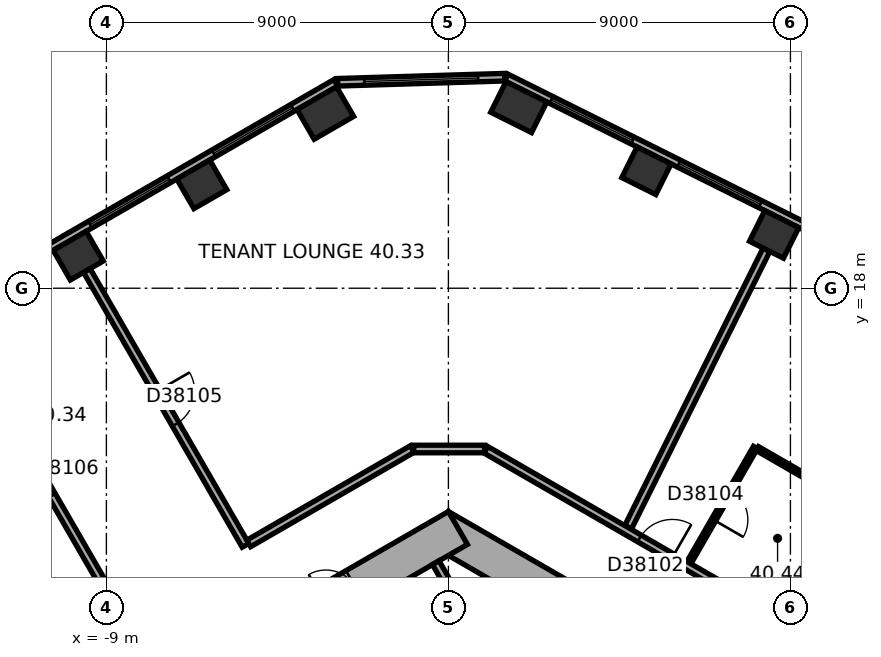
"""IFC4 building model, lengths in metres.
Left out: names, types, materials, properties, quantities, classifications, styles, units other than length and angle.
Written with IfcOpenShell. Run it as: python <this file> out.ifc"""

import sys

from ifc_helpers import new_model, si_unit, direction, frame, frame_2d, origin, origin_2d, place, context, subcontext, project, spatial, rectangle, extrude, element, fill, save


model = new_model("IFC4")
c1 = context("Model", 3, precision=1e-05, world=origin(), true_north=direction((0.0, 1.0)))
c2 = subcontext(c1, "Body", "Model", "MODEL_VIEW")
j1 = project(units=[si_unit("LENGTHUNIT", "METRE"), si_unit("PLANEANGLEUNIT", "RADIAN")], contexts=[c1])
p1 = place(None, origin())
s1 = spatial("IfcSite", under=j1, at=p1, CompositionType="ELEMENT")
p2 = place(p1, origin())
s2 = spatial("IfcBuilding", under=s1, at=p2, CompositionType="ELEMENT")
p3 = place(p2, frame((0.0, 0.0, 165.1)))
s3 = spatial("IfcBuildingStorey", under=s2, at=p3, CompositionType="ELEMENT", Elevation=165.1)
for number, where, z_axis, x_axis in (
    (1, (8.571, 19.416, 0.0), (0.0, 0.0, 1.0), (-0.895, 0.446, 0.0)),
    (2, (5.211, 21.091, 0.0), (0.0, 0.0, 1.0), (-0.895, 0.446, 0.0)),
):
    element("IfcColumn", number, at=place(p3, frame(where, z_axis=z_axis, x_axis=x_axis)), inside=s3, PredefinedType="COLUMN", context=c2, shape_type="SweptSolid", body=[
        extrude(rectangle(XDim=1.0, YDim=0.9, at=origin_2d()), origin(), (0.0, 0.0, 1.0), 3.7),
    ])
for number, where, z_axis, x_axis in (
    (3, (1.852, 22.766, 0.0), (0.0, 0.0, 1.0), (-0.895, 0.446, 0.0)),
    (4, (-3.238, 22.61, 0.0), (0.0, 0.0, 1.0), (-0.866, -0.5, 0.0)),
):
    element("IfcColumn", number, at=place(p3, frame(where, z_axis=z_axis, x_axis=x_axis)), inside=s3, PredefinedType="COLUMN", context=c2, shape_type="SweptSolid", body=[
        extrude(rectangle(XDim=1.2, YDim=0.9, at=origin_2d()), origin(), (0.0, 0.0, 1.0), 3.7),
    ])
for number, where, z_axis, x_axis in (
    (5, (-6.489, 20.733, 0.0), (0.0, 0.0, 1.0), (-0.866, -0.5, 0.0)),
    (6, (-9.74, 18.856, 0.0), (0.0, 0.0, 1.0), (-0.866, -0.5, 0.0)),
):
    element("IfcColumn", number, at=place(p3, frame(where, z_axis=z_axis, x_axis=x_axis)), inside=s3, PredefinedType="COLUMN", context=c2, shape_type="SweptSolid", body=[
        extrude(rectangle(XDim=1.0, YDim=0.9, at=origin_2d()), origin(), (0.0, 0.0, 1.0), 3.7),
    ])
p4 = place(p3, frame((10.25, 5.629, 0.0), z_axis=(0.0, 0.0, 1.0), x_axis=(-0.866022616891, 0.50000482701, 0.0)))
e7 = element("IfcWall", 7, at=p4, inside=s3, PredefinedType="SHEAR", context=c2, shape_type="SweptSolid", body=[
    extrude(rectangle(XDim=12.125, YDim=1.0, at=frame_2d((6.062, 0.0))), origin(), (0.0, 0.0, 1.0), 3.7),
])
p5 = place(p4, frame((2.712, 0.0, 0.0)))
e8 = element("IfcOpeningElement", 8, at=p5, cuts=e7, PredefinedType="OPENING", context=c2, shape_type="SweptSolid", body=[
    extrude(rectangle(XDim=0.9, YDim=2.1, at=frame_2d((0.45, 1.05))), frame((0.0, 0.51, 0.0), z_axis=(0.0, -1.0, 0.0), x_axis=(1.0, 0.0, 0.0)), (0.0, 0.0, 1.0), 1.02),
])
p6 = place(p4, frame((6.612, 0.0, 0.0)))
e9 = element("IfcOpeningElement", 9, at=p6, cuts=e7, PredefinedType="OPENING", context=c2, shape_type="SweptSolid", body=[
    extrude(rectangle(XDim=0.9, YDim=2.1, at=frame_2d((0.45, 1.05))), frame((0.0, 0.51, 0.0), z_axis=(0.0, -1.0, 0.0), x_axis=(1.0, 0.0, 0.0)), (0.0, 0.0, 1.0), 1.02),
])
p7 = place(p3, frame((0.25, 11.691, 0.0), z_axis=(0.0, 0.0, 1.0), x_axis=(-0.866022616891, -0.50000482701, 0.0)))
e10 = element("IfcWall", 10, at=p7, inside=s3, PredefinedType="SHEAR", context=c2, shape_type="SweptSolid", body=[
    extrude(rectangle(XDim=12.125, YDim=1.0, at=frame_2d((6.062, 0.0))), origin(), (0.0, 0.0, 1.0), 3.7),
])
p8 = place(p7, frame((6.262, 0.0, 0.0)))
e11 = element("IfcOpeningElement", 11, at=p8, cuts=e10, PredefinedType="OPENING", context=c2, shape_type="SweptSolid", body=[
    extrude(rectangle(XDim=1.5, YDim=2.1, at=frame_2d((0.75, 1.05))), frame((0.0, 0.51, 0.0), z_axis=(0.0, -1.0, 0.0), x_axis=(1.0, 0.0, 0.0)), (0.0, 0.0, 1.0), 1.02),
])
p9 = place(p7, frame((3.112, 0.0, 0.0)))
e12 = element("IfcOpeningElement", 12, at=p9, cuts=e10, PredefinedType="OPENING", context=c2, shape_type="SweptSolid", body=[
    extrude(rectangle(XDim=0.9, YDim=2.1, at=frame_2d((0.45, 1.05))), frame((0.0, 0.51, 0.0), z_axis=(0.0, -1.0, 0.0), x_axis=(1.0, 0.0, 0.0)), (0.0, 0.0, 1.0), 1.02),
])
p10 = place(p3, frame((19.464, 14.599, 0.0), z_axis=(0.0, 0.0, 1.0), x_axis=(-0.894935755043, 0.446195018289, 0.0)))
e13 = element("IfcWall", 13, at=p10, inside=s3, PredefinedType="STANDARD", context=c2, shape_type="SweptSolid", body=[
    extrude(rectangle(XDim=20.044, YDim=0.2, at=frame_2d((10.022, 0.0))), origin(), (0.0, 0.0, 1.0), 3.7),
])
p11 = place(p10, frame((1.313, 0.0, 0.9)))
e14 = element("IfcOpeningElement", 14, at=p11, cuts=e13, PredefinedType="OPENING", context=c2, shape_type="SweptSolid", body=[
    extrude(rectangle(XDim=2.4, YDim=2.0, at=frame_2d((1.2, 1.0))), frame((0.0, 0.11, 0.0), z_axis=(0.0, -1.0, 0.0), x_axis=(1.0, 0.0, 0.0)), (0.0, 0.0, 1.0), 0.22),
])
p12 = place(p10, frame((5.067, 0.0, 0.9)))
e15 = element("IfcOpeningElement", 15, at=p12, cuts=e13, PredefinedType="OPENING", context=c2, shape_type="SweptSolid", body=[
    extrude(rectangle(XDim=2.4, YDim=2.0, at=frame_2d((1.2, 1.0))), frame((0.0, 0.11, 0.0), z_axis=(0.0, -1.0, 0.0), x_axis=(1.0, 0.0, 0.0)), (0.0, 0.0, 1.0), 0.22),
])
p13 = place(p10, frame((8.821, 0.0, 0.9)))
e16 = element("IfcOpeningElement", 16, at=p13, cuts=e13, PredefinedType="OPENING", context=c2, shape_type="SweptSolid", body=[
    extrude(rectangle(XDim=2.4, YDim=2.0, at=frame_2d((1.2, 1.0))), frame((0.0, 0.11, 0.0), z_axis=(0.0, -1.0, 0.0), x_axis=(1.0, 0.0, 0.0)), (0.0, 0.0, 1.0), 0.22),
])
p14 = place(p10, frame((12.575, 0.0, 0.9)))
e17 = element("IfcOpeningElement", 17, at=p14, cuts=e13, PredefinedType="OPENING", context=c2, shape_type="SweptSolid", body=[
    extrude(rectangle(XDim=2.4, YDim=2.0, at=frame_2d((1.2, 1.0))), frame((0.0, 0.11, 0.0), z_axis=(0.0, -1.0, 0.0), x_axis=(1.0, 0.0, 0.0)), (0.0, 0.0, 1.0), 0.22),
])
p15 = place(p10, frame((16.329, 0.0, 0.9)))
e18 = element("IfcOpeningElement", 18, at=p15, cuts=e13, PredefinedType="OPENING", context=c2, shape_type="SweptSolid", body=[
    extrude(rectangle(XDim=2.4, YDim=2.0, at=frame_2d((1.2, 1.0))), frame((0.0, 0.11, 0.0), z_axis=(0.0, -1.0, 0.0), x_axis=(1.0, 0.0, 0.0)), (0.0, 0.0, 1.0), 0.22),
])
p16 = place(p3, frame((1.479, 23.553, 0.0), z_axis=(0.0, 0.0, 1.0), x_axis=(-0.999534786117, -0.03049936625, 0.0)))
e19 = element("IfcWall", 19, at=p16, inside=s3, PredefinedType="STANDARD", context=c2, shape_type="SweptSolid", body=[
    extrude(rectangle(XDim=4.395, YDim=0.2, at=frame_2d((2.197, 0.0))), origin(), (0.0, 0.0, 1.0), 3.7),
])
p17 = place(p16, frame((0.698, 0.0, 0.9)))
e20 = element("IfcOpeningElement", 20, at=p17, cuts=e19, PredefinedType="OPENING", context=c2, shape_type="SweptSolid", body=[
    extrude(rectangle(XDim=3.0, YDim=2.0, at=frame_2d((1.5, 1.0))), frame((0.0, 0.11, 0.0), z_axis=(0.0, -1.0, 0.0), x_axis=(1.0, 0.0, 0.0)), (0.0, 0.0, 1.0), 0.22),
])
p18 = place(p3, frame((-2.961, 23.405, 0.0), z_axis=(0.0, 0.0, 1.0), x_axis=(-0.866023315909, -0.500003616288, 0.0)))
e21 = element("IfcWall", 21, at=p18, inside=s3, PredefinedType="STANDARD", context=c2, shape_type="SweptSolid", body=[
    extrude(rectangle(XDim=20.044, YDim=0.2, at=frame_2d((10.022, 0.0))), origin(), (0.0, 0.0, 1.0), 3.7),
])
p19 = place(p18, frame((1.314, 0.0, 0.9)))
e22 = element("IfcOpeningElement", 22, at=p19, cuts=e21, PredefinedType="OPENING", context=c2, shape_type="SweptSolid", body=[
    extrude(rectangle(XDim=2.4, YDim=2.0, at=frame_2d((1.2, 1.0))), frame((0.0, 0.11, 0.0), z_axis=(0.0, -1.0, 0.0), x_axis=(1.0, 0.0, 0.0)), (0.0, 0.0, 1.0), 0.22),
])
p20 = place(p18, frame((5.069, 0.0, 0.9)))
e23 = element("IfcOpeningElement", 23, at=p20, cuts=e21, PredefinedType="OPENING", context=c2, shape_type="SweptSolid", body=[
    extrude(rectangle(XDim=2.4, YDim=2.0, at=frame_2d((1.2, 1.0))), frame((0.0, 0.11, 0.0), z_axis=(0.0, -1.0, 0.0), x_axis=(1.0, 0.0, 0.0)), (0.0, 0.0, 1.0), 0.22),
])
p21 = place(p18, frame((8.823, 0.0, 0.9)))
e24 = element("IfcOpeningElement", 24, at=p21, cuts=e21, PredefinedType="OPENING", context=c2, shape_type="SweptSolid", body=[
    extrude(rectangle(XDim=2.4, YDim=2.0, at=frame_2d((1.2, 1.0))), frame((0.0, 0.11, 0.0), z_axis=(0.0, -1.0, 0.0), x_axis=(1.0, 0.0, 0.0)), (0.0, 0.0, 1.0), 0.22),
])
p22 = place(p18, frame((12.577, 0.0, 0.9)))
e25 = element("IfcOpeningElement", 25, at=p22, cuts=e21, PredefinedType="OPENING", context=c2, shape_type="SweptSolid", body=[
    extrude(rectangle(XDim=2.4, YDim=2.0, at=frame_2d((1.2, 1.0))), frame((0.0, 0.11, 0.0), z_axis=(0.0, -1.0, 0.0), x_axis=(1.0, 0.0, 0.0)), (0.0, 0.0, 1.0), 0.22),
])
p23 = place(p18, frame((16.331, 0.0, 0.9)))
e26 = element("IfcOpeningElement", 26, at=p23, cuts=e21, PredefinedType="OPENING", context=c2, shape_type="SweptSolid", body=[
    extrude(rectangle(XDim=2.4, YDim=2.0, at=frame_2d((1.2, 1.0))), frame((0.0, 0.11, 0.0), z_axis=(0.0, -1.0, 0.0), x_axis=(1.0, 0.0, 0.0)), (0.0, 0.0, 1.0), 0.22),
])
p24 = place(p3, frame((0.767, 8.872, 0.0), z_axis=(0.0, 0.0, 1.0), x_axis=(-0.499994660107, 0.866028486751, 0.0)))
e27 = element("IfcWall", 27, at=p24, inside=s3, PredefinedType="PARTITIONING", context=c2, shape_type="SweptSolid", body=[
    extrude(rectangle(XDim=2.2, YDim=0.2, at=frame_2d((1.1, 0.0))), origin(), (0.0, 0.0, 1.0), 3.42),
])
p25 = place(p3, frame((-12.766, 16.589, 0.0), z_axis=(0.0, 0.0, 1.0), x_axis=(0.500010139422, -0.866019549707, 0.0)))
e28 = element("IfcWall", 28, at=p25, inside=s3, PredefinedType="PARTITIONING", context=c2, shape_type="SweptSolid", body=[
    extrude(rectangle(XDim=8.35, YDim=0.2, at=frame_2d((4.175, 0.0))), origin(), (0.0, 0.0, 1.0), 3.42),
])
p26 = place(p25, frame((3.675, 0.0, 0.0)))
e29 = element("IfcOpeningElement", 29, at=p26, cuts=e28, PredefinedType="OPENING", context=c2, shape_type="SweptSolid", body=[
    extrude(rectangle(XDim=1.0, YDim=2.1, at=frame_2d((0.5, 1.05))), frame((0.0, 0.11, 0.0), z_axis=(0.0, -1.0, 0.0), x_axis=(1.0, 0.0, 0.0)), (0.0, 0.0, 1.0), 0.22),
])
p27 = place(p3, frame((-9.515, 18.466, 0.0), z_axis=(0.0, 0.0, 1.0), x_axis=(0.500010139422, -0.866019549707, 0.0)))
e30 = element("IfcWall", 30, at=p27, inside=s3, PredefinedType="PARTITIONING", context=c2, shape_type="SweptSolid", body=[
    extrude(rectangle(XDim=8.35, YDim=0.2, at=frame_2d((4.175, 0.0))), origin(), (0.0, 0.0, 1.0), 2.87),
])
p28 = place(p27, frame((3.675, 0.0, 0.0)))
e31 = element("IfcOpeningElement", 31, at=p28, cuts=e30, PredefinedType="OPENING", context=c2, shape_type="SweptSolid", body=[
    extrude(rectangle(XDim=1.0, YDim=2.1, at=frame_2d((0.5, 1.05))), frame((0.0, 0.11, 0.0), z_axis=(0.0, -1.0, 0.0), x_axis=(1.0, 0.0, 0.0)), (0.0, 0.0, 1.0), 0.22),
])
p29 = place(p3, frame((-0.95, 13.77, 0.0), z_axis=(0.0, 0.0, 1.0), x_axis=(-0.866036689987, -0.499980451214, 0.0)))
e32 = element("IfcWall", 32, at=p29, inside=s3, PredefinedType="PARTITIONING", context=c2, shape_type="SweptSolid", body=[
    extrude(rectangle(XDim=4.969, YDim=0.2, at=frame_2d((2.485, 0.0))), origin(), (0.0, 0.0, 1.0), 3.42),
])
p30 = place(p3, frame((0.95, 13.77, 0.0), z_axis=(0.0, 0.0, 1.0), x_axis=(-1.0, 0.0, 0.0)))
e33 = element("IfcWall", 33, at=p30, inside=s3, PredefinedType="PARTITIONING", context=c2, shape_type="SweptSolid", body=[
    extrude(rectangle(XDim=1.86, YDim=0.2, at=frame_2d((0.93, 0.0))), origin(), (0.0, 0.0, 1.0), 3.42),
])
p31 = place(p3, frame((6.33, 10.779, 0.0), z_axis=(0.0, 0.0, 1.0), x_axis=(0.500010275428, 0.866019471182, 0.0)))
e34 = element("IfcWall", 34, at=p31, inside=s3, PredefinedType="PARTITIONING", context=c2, shape_type="SweptSolid", body=[
    extrude(rectangle(XDim=3.5, YDim=0.12, at=frame_2d((1.75, 0.0))), origin(), (0.0, 0.0, 1.0), 3.42),
])
p32 = place(p31, frame((1.3, 0.0, 0.0)))
e35 = element("IfcOpeningElement", 35, at=p32, cuts=e34, PredefinedType="OPENING", context=c2, shape_type="SweptSolid", body=[
    extrude(rectangle(XDim=0.9, YDim=2.1, at=frame_2d((0.45, 1.05))), frame((0.0, 0.07, 0.0), z_axis=(0.0, -1.0, 0.0), x_axis=(1.0, 0.0, 0.0)), (0.0, 0.0, 1.0), 0.14),
])
p33 = place(p3, frame((8.132, 13.78, 0.0), z_axis=(0.0, 0.0, 1.0), x_axis=(0.866039519639, -0.499975549825, 0.0)))
e36 = element("IfcWall", 36, at=p33, inside=s3, PredefinedType="PARTITIONING", context=c2, shape_type="SweptSolid", body=[
    extrude(rectangle(XDim=3.34, YDim=0.12, at=frame_2d((1.67, 0.0))), origin(), (0.0, 0.0, 1.0), 3.42),
])
p34 = place(p3, frame((8.37, 19.013, 0.0), z_axis=(0.0, 0.0, 1.0), x_axis=(-0.446183598632, -0.894941448538, 0.0)))
e37 = element("IfcWall", 37, at=p34, inside=s3, PredefinedType="PARTITIONING", context=c2, shape_type="SweptSolid", body=[
    extrude(rectangle(XDim=8.156, YDim=0.2, at=frame_2d((4.078, 0.0))), origin(), (0.0, 0.0, 1.0), 3.42),
])
p35 = place(p3, frame((9.224, 8.993, 0.0), z_axis=(0.0, 0.0, 1.0), x_axis=(-0.866031754707, 0.499988999718, 0.0)))
e38 = element("IfcWall", 38, at=p35, inside=s3, PredefinedType="PARTITIONING", context=c2, shape_type="SweptSolid", body=[
    extrude(rectangle(XDim=9.514, YDim=0.2, at=frame_2d((4.757, 0.0))), origin(), (0.0, 0.0, 1.0), 3.42),
])
p36 = place(p35, frame((3.848, 0.0, 0.0)))
e39 = element("IfcOpeningElement", 39, at=p36, cuts=e38, PredefinedType="OPENING", context=c2, shape_type="SweptSolid", body=[
    extrude(rectangle(XDim=1.0, YDim=2.1, at=frame_2d((0.5, 1.05))), frame((0.0, 0.11, 0.0), z_axis=(0.0, -1.0, 0.0), x_axis=(1.0, 0.0, 0.0)), (0.0, 0.0, 1.0), 0.22),
])
p37 = place(p3, frame((10.994, 12.058, 0.0), z_axis=(0.0, 0.0, 1.0), x_axis=(-0.500009156386, -0.866020117278, 0.0)))
e40 = element("IfcWall", 40, at=p37, inside=s3, PredefinedType="PARTITIONING", context=c2, shape_type="SweptSolid", body=[
    extrude(rectangle(XDim=3.44, YDim=0.12, at=frame_2d((1.72, 0.0))), origin(), (0.0, 0.0, 1.0), 3.42),
])
p38 = place(p14, origin())
e41 = element("IfcWindow", 41, at=p38, inside=s3, PartitioningType="SINGLE_PANEL", PredefinedType="WINDOW", context=c2, shape_type="SweptSolid", body=[
    extrude(rectangle(XDim=2.4, YDim=2.0, at=frame_2d((1.2, 1.0))), frame((0.0, 0.03, 0.0), z_axis=(0.0, -1.0, 0.0), x_axis=(1.0, 0.0, 0.0)), (0.0, 0.0, 1.0), 0.06),
])
fill(e17, e41)
p39 = place(p15, origin())
e42 = element("IfcWindow", 42, at=p39, inside=s3, PartitioningType="SINGLE_PANEL", PredefinedType="WINDOW", context=c2, shape_type="SweptSolid", body=[
    extrude(rectangle(XDim=2.4, YDim=2.0, at=frame_2d((1.2, 1.0))), frame((0.0, 0.03, 0.0), z_axis=(0.0, -1.0, 0.0), x_axis=(1.0, 0.0, 0.0)), (0.0, 0.0, 1.0), 0.06),
])
fill(e18, e42)
p40 = place(p17, origin())
e43 = element("IfcWindow", 43, at=p40, inside=s3, PartitioningType="SINGLE_PANEL", PredefinedType="WINDOW", context=c2, shape_type="SweptSolid", body=[
    extrude(rectangle(XDim=3.0, YDim=2.0, at=frame_2d((1.5, 1.0))), frame((0.0, 0.03, 0.0), z_axis=(0.0, -1.0, 0.0), x_axis=(1.0, 0.0, 0.0)), (0.0, 0.0, 1.0), 0.06),
])
fill(e20, e43)
p41 = place(p19, origin())
e44 = element("IfcWindow", 44, at=p41, inside=s3, PartitioningType="SINGLE_PANEL", PredefinedType="WINDOW", context=c2, shape_type="SweptSolid", body=[
    extrude(rectangle(XDim=2.4, YDim=2.0, at=frame_2d((1.2, 1.0))), frame((0.0, 0.03, 0.0), z_axis=(0.0, -1.0, 0.0), x_axis=(1.0, 0.0, 0.0)), (0.0, 0.0, 1.0), 0.06),
])
fill(e22, e44)
p42 = place(p20, origin())
e45 = element("IfcWindow", 45, at=p42, inside=s3, PartitioningType="SINGLE_PANEL", PredefinedType="WINDOW", context=c2, shape_type="SweptSolid", body=[
    extrude(rectangle(XDim=2.4, YDim=2.0, at=frame_2d((1.2, 1.0))), frame((0.0, 0.03, 0.0), z_axis=(0.0, -1.0, 0.0), x_axis=(1.0, 0.0, 0.0)), (0.0, 0.0, 1.0), 0.06),
])
fill(e23, e45)
p43 = place(p36, origin())
e46 = element("IfcDoor", 46, at=p43, inside=s3, OperationType="SINGLE_SWING_LEFT", PredefinedType="DOOR", context=c2, shape_type="SweptSolid", body=[
    extrude(rectangle(XDim=1.0, YDim=2.1, at=frame_2d((0.5, 1.05))), frame((0.0, 0.025, 0.0), z_axis=(0.0, -1.0, 0.0), x_axis=(1.0, 0.0, 0.0)), (0.0, 0.0, 1.0), 0.05),
])
fill(e39, e46)
p44 = place(p32, origin())
e47 = element("IfcDoor", 47, at=p44, inside=s3, OperationType="SINGLE_SWING_LEFT", PredefinedType="DOOR", context=c2, shape_type="SweptSolid", body=[
    extrude(rectangle(XDim=0.9, YDim=2.1, at=frame_2d((0.45, 1.05))), frame((0.0, 0.025, 0.0), z_axis=(0.0, -1.0, 0.0), x_axis=(1.0, 0.0, 0.0)), (0.0, 0.0, 1.0), 0.05),
])
fill(e35, e47)
p45 = place(p28, origin())
e48 = element("IfcDoor", 48, at=p45, inside=s3, OperationType="SINGLE_SWING_LEFT", PredefinedType="DOOR", context=c2, shape_type="SweptSolid", body=[
    extrude(rectangle(XDim=1.0, YDim=2.1, at=frame_2d((0.5, 1.05))), frame((0.0, 0.025, 0.0), z_axis=(0.0, -1.0, 0.0), x_axis=(1.0, 0.0, 0.0)), (0.0, 0.0, 1.0), 0.05),
])
fill(e31, e48)
p46 = place(p26, origin())
e49 = element("IfcDoor", 49, at=p46, inside=s3, OperationType="SINGLE_SWING_LEFT", PredefinedType="DOOR", context=c2, shape_type="SweptSolid", body=[
    extrude(rectangle(XDim=1.0, YDim=2.1, at=frame_2d((0.5, 1.05))), frame((0.0, 0.025, 0.0), z_axis=(0.0, -1.0, 0.0), x_axis=(1.0, 0.0, 0.0)), (0.0, 0.0, 1.0), 0.05),
])
fill(e29, e49)
save(model, sys.argv[1])
